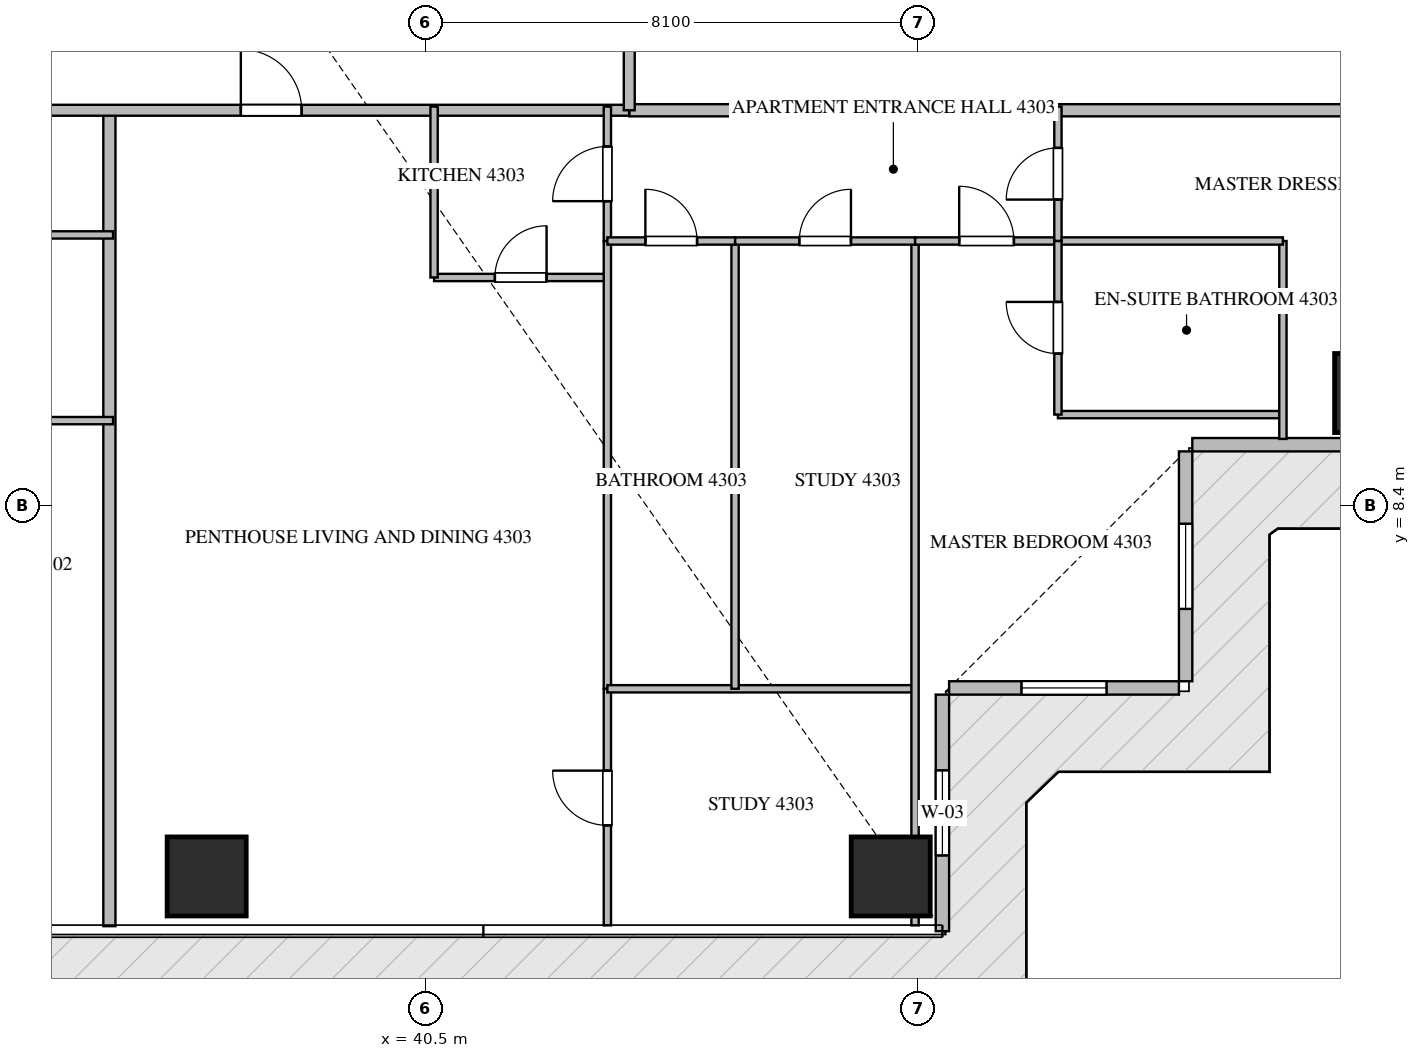
"""IFC4 building model, lengths in metres.
Left out: names, types, materials, properties, quantities, classifications, styles, units other than length and angle.
Written with IfcOpenShell. Run it as: python <this file> out.ifc"""

import sys

from ifc_helpers import new_model, si_unit, direction, frame, frame_2d, origin, origin_2d, place, context, subcontext, project, spatial, rectangle, extrude, source, transform, mapped, element, fill, save


model = new_model("IFC4")
c1 = context("Model", 3, precision=1e-05, world=origin(), true_north=direction((0.0, 1.0)))
c2 = subcontext(c1, "Body", "Model", "MODEL_VIEW")
j1 = project(units=[si_unit("LENGTHUNIT", "METRE"), si_unit("PLANEANGLEUNIT", "RADIAN")], contexts=[c1])
p1 = place(None, origin())
s1 = spatial("IfcSite", under=j1, at=p1, CompositionType="ELEMENT")
p2 = place(p1, origin())
s2 = spatial("IfcBuilding", under=s1, at=p2, CompositionType="ELEMENT")
p3 = place(p2, frame((0.0, 0.0, 172.65)))
s3 = spatial("IfcBuildingStorey", under=s2, at=p3, CompositionType="ELEMENT", Elevation=172.65)
m1 = source(origin(), c2, "Body", "SweptSolid", [
    extrude(rectangle(XDim=1.3, YDim=1.3, at=origin_2d()), origin(), (0.0, 0.0, 1.0), 3.75),
])
for number, where, z_axis, x_axis in (
    (1, (36.9, 2.3, -0.26), (0.0, 0.0, 1.0), (1.0, 0.0, 0.0)),
    (2, (48.15, 2.3, -0.26), (0.0, 0.0, 1.0), (1.0, 0.0, 0.0)),
    (3, (56.1, 10.25, -0.26), (0.0, 0.0, 1.0), (1.0, 0.0, 0.0)),
):
    element("IfcColumn", number, at=place(p3, frame(where, z_axis=z_axis, x_axis=x_axis)), inside=s3, PredefinedType="COLUMN", context=c2, shape_type="MappedRepresentation", body=[
        mapped(m1, transform((0.0, 0.0, 0.0), scale=1.0)),
    ])
p4 = place(p3, frame((49.0, 1.4, 0.0), z_axis=(0.0, 0.0, 1.0), x_axis=(0.0, 1.0, 0.0)))
e4 = element("IfcWall", 4, at=p4, inside=s3, PredefinedType="ELEMENTEDWALL", context=c2, shape_type="SweptSolid", body=[
    extrude(rectangle(XDim=3.89, YDim=0.22, at=frame_2d((1.945, 0.0))), origin(), (0.0, 0.0, 1.0), 3.475),
])
p5 = place(p4, frame((1.245, 0.0, 0.65)))
e5 = element("IfcOpeningElement", 5, at=p5, cuts=e4, PredefinedType="OPENING", context=c2, shape_type="SweptSolid", body=[
    extrude(rectangle(XDim=1.4, YDim=2.05, at=frame_2d((0.7, 1.025))), frame((0.0, 0.12, 0.0), z_axis=(0.0, -1.0, 0.0), x_axis=(1.0, 0.0, 0.0)), (0.0, 0.0, 1.0), 0.24),
])
p6 = place(p3, frame((49.11, 5.4, 0.0), z_axis=(0.0, 0.0, 1.0), x_axis=(1.0, 0.0, 0.0)))
e6 = element("IfcWall", 6, at=p6, inside=s3, PredefinedType="ELEMENTEDWALL", context=c2, shape_type="SweptSolid", body=[
    extrude(rectangle(XDim=3.78, YDim=0.22, at=frame_2d((1.89, 0.0))), origin(), (0.0, 0.0, 1.0), 3.475),
])
p7 = place(p6, frame((1.19, 0.0, 0.65)))
e7 = element("IfcOpeningElement", 7, at=p7, cuts=e6, PredefinedType="OPENING", context=c2, shape_type="SweptSolid", body=[
    extrude(rectangle(XDim=1.4, YDim=2.05, at=frame_2d((0.7, 1.025))), frame((0.0, 0.12, 0.0), z_axis=(0.0, -1.0, 0.0), x_axis=(1.0, 0.0, 0.0)), (0.0, 0.0, 1.0), 0.24),
])
p8 = place(p3, frame((53.0, 5.51, 0.0), z_axis=(0.0, 0.0, 1.0), x_axis=(0.0, 1.0, 0.0)))
e8 = element("IfcWall", 8, at=p8, inside=s3, PredefinedType="ELEMENTEDWALL", context=c2, shape_type="SweptSolid", body=[
    extrude(rectangle(XDim=3.78, YDim=0.22, at=frame_2d((1.89, 0.0))), origin(), (0.0, 0.0, 1.0), 3.475),
])
p9 = place(p8, frame((1.19, 0.0, 0.65)))
e9 = element("IfcOpeningElement", 9, at=p9, cuts=e8, PredefinedType="OPENING", context=c2, shape_type="SweptSolid", body=[
    extrude(rectangle(XDim=1.4, YDim=2.05, at=frame_2d((0.7, 1.025))), frame((0.0, 0.12, 0.0), z_axis=(0.0, -1.0, 0.0), x_axis=(1.0, 0.0, 0.0)), (0.0, 0.0, 1.0), 0.24),
])
p10 = place(p3, frame((53.11, 9.4, 0.0), z_axis=(0.0, 0.0, 1.0), x_axis=(1.0, 0.0, 0.0)))
e10 = element("IfcWall", 10, at=p10, inside=s3, PredefinedType="ELEMENTEDWALL", context=c2, shape_type="SweptSolid", body=[
    extrude(rectangle(XDim=3.89, YDim=0.22, at=frame_2d((1.945, 0.0))), origin(), (0.0, 0.0, 1.0), 3.475),
])
p11 = place(p3, frame((35.3, 1.482, 0.0), z_axis=(0.0, 0.0, 1.0), x_axis=(0.0, 1.0, 0.0)))
e11 = element("IfcWall", 11, at=p11, inside=s3, PredefinedType="PARTITIONING", context=c2, shape_type="SweptSolid", body=[
    extrude(rectangle(XDim=13.418, YDim=0.2, at=frame_2d((6.709, 0.0))), origin(), (0.0, 0.0, 1.0), 3.49),
])
p12 = place(p3, frame((43.85, 14.9, 0.0), z_axis=(0.0, 0.0, 1.0), x_axis=(1.0, 0.0, 0.0)))
e12 = element("IfcWall", 12, at=p12, inside=s3, PredefinedType="PARTITIONING", context=c2, shape_type="SweptSolid", body=[
    extrude(rectangle(XDim=13.068, YDim=0.2, at=frame_2d((6.534, 0.0))), origin(), (0.0, 0.0, 1.0), 3.49),
])
p13 = place(p3, frame((20.952, 14.9, 0.0), z_axis=(0.0, 0.0, 1.0), x_axis=(1.0, 0.0, 0.0)))
e13 = element("IfcWall", 13, at=p13, inside=s3, PredefinedType="PARTITIONING", context=c2, shape_type="SweptSolid", body=[
    extrude(rectangle(XDim=22.896, YDim=0.18, at=frame_2d((11.448, 0.0))), origin(), (0.0, 0.0, 1.0), 3.49),
])
p14 = place(p13, frame((2.387, 0.0, 0.0)))
e14 = element("IfcOpeningElement", 14, at=p14, cuts=e13, PredefinedType="OPENING", context=c2, shape_type="SweptSolid", body=[
    extrude(rectangle(XDim=1.0, YDim=2.15, at=frame_2d((0.5, 1.075))), frame((0.0, 0.1, 0.0), z_axis=(0.0, -1.0, 0.0), x_axis=(1.0, 0.0, 0.0)), (0.0, 0.0, 1.0), 0.2),
])
p15 = place(p13, frame((6.591, 0.0, 0.0)))
e15 = element("IfcOpeningElement", 15, at=p15, cuts=e13, PredefinedType="OPENING", context=c2, shape_type="SweptSolid", body=[
    extrude(rectangle(XDim=1.0, YDim=2.15, at=frame_2d((0.5, 1.075))), frame((0.0, 0.1, 0.0), z_axis=(0.0, -1.0, 0.0), x_axis=(1.0, 0.0, 0.0)), (0.0, 0.0, 1.0), 0.2),
])
p16 = place(p13, frame((16.51, 0.0, 0.0)))
e16 = element("IfcOpeningElement", 16, at=p16, cuts=e13, PredefinedType="OPENING", context=c2, shape_type="SweptSolid", body=[
    extrude(rectangle(XDim=1.0, YDim=2.15, at=frame_2d((0.5, 1.075))), frame((0.0, 0.1, 0.0), z_axis=(0.0, -1.0, 0.0), x_axis=(1.0, 0.0, 0.0)), (0.0, 0.0, 1.0), 0.2),
])
p17 = place(p3, frame((43.85, 14.9, 0.0), z_axis=(0.0, 0.0, 1.0), x_axis=(0.0, 1.0, 0.0)))
e17 = element("IfcWall", 17, at=p17, inside=s3, PredefinedType="PARTITIONING", context=c2, shape_type="SweptSolid", body=[
    extrude(rectangle(XDim=18.7, YDim=0.18, at=frame_2d((9.35, 0.0))), origin(), (0.0, 0.0, 1.0), 3.49),
])
p18 = place(p17, frame((1.805, 0.0, 0.0)))
e18 = element("IfcOpeningElement", 18, at=p18, cuts=e17, PredefinedType="OPENING", context=c2, shape_type="SweptSolid", body=[
    extrude(rectangle(XDim=1.0, YDim=2.15, at=frame_2d((0.5, 1.075))), frame((0.0, 0.1, 0.0), z_axis=(0.0, -1.0, 0.0), x_axis=(1.0, 0.0, 0.0)), (0.0, 0.0, 1.0), 0.2),
])
for number, where, z_axis, x_axis in (
    (19, (30.3, 9.796, 0.0), (0.0, 0.0, 1.0), (1.0, 0.0, 0.0)),
    (20, (30.3, 12.85, 0.0), (0.0, 0.0, 1.0), (1.0, 0.0, 0.0)),
):
    element("IfcWall", number, at=place(p3, frame(where, z_axis=z_axis, x_axis=x_axis)), inside=s3, PredefinedType="PARTITIONING", context=c2, shape_type="SweptSolid", body=[
        extrude(rectangle(XDim=5.06, YDim=0.12, at=frame_2d((2.53, 0.0))), origin(), (0.0, 0.0, 1.0), 3.49),
    ])
p19 = place(p3, frame((40.64, 12.15, 0.0), z_axis=(0.0, 0.0, 1.0), x_axis=(1.0, 0.0, 0.0)))
e21 = element("IfcWall", 21, at=p19, inside=s3, PredefinedType="PARTITIONING", context=c2, shape_type="SweptSolid", body=[
    extrude(rectangle(XDim=2.85, YDim=0.12, at=frame_2d((1.425, 0.0))), origin(), (0.0, 0.0, 1.0), 3.49),
])
p20 = place(p19, frame((1.0, 0.0, 0.0)))
e22 = element("IfcOpeningElement", 22, at=p20, cuts=e21, PredefinedType="OPENING", context=c2, shape_type="SweptSolid", body=[
    extrude(rectangle(XDim=0.85, YDim=2.1, at=frame_2d((0.425, 1.05))), frame((0.0, 0.07, 0.0), z_axis=(0.0, -1.0, 0.0), x_axis=(1.0, 0.0, 0.0)), (0.0, 0.0, 1.0), 0.14),
])
p21 = place(p3, frame((40.64, 12.15, 0.0), z_axis=(0.0, 0.0, 1.0), x_axis=(0.0, 1.0, 0.0)))
e23 = element("IfcWall", 23, at=p21, inside=s3, PredefinedType="PARTITIONING", context=c2, shape_type="SweptSolid", body=[
    extrude(rectangle(XDim=2.81, YDim=0.12, at=frame_2d((1.405, 0.0))), origin(), (0.0, 0.0, 1.0), 3.49),
])
p22 = place(p3, frame((43.49, 12.75, 0.0), z_axis=(0.0, 0.0, 1.0), x_axis=(0.0, 1.0, 0.0)))
e24 = element("IfcWall", 24, at=p22, inside=s3, PredefinedType="PARTITIONING", context=c2, shape_type="SweptSolid", body=[
    extrude(rectangle(XDim=2.21, YDim=0.12, at=frame_2d((1.105, 0.0))), origin(), (0.0, 0.0, 1.0), 3.49),
])
p23 = place(p22, frame((0.655, 0.0, 0.0)))
e25 = element("IfcOpeningElement", 25, at=p23, cuts=e24, PredefinedType="OPENING", context=c2, shape_type="SweptSolid", body=[
    extrude(rectangle(XDim=0.9, YDim=2.1, at=frame_2d((0.45, 1.05))), frame((0.0, 0.07, 0.0), z_axis=(0.0, -1.0, 0.0), x_axis=(1.0, 0.0, 0.0)), (0.0, 0.0, 1.0), 0.14),
])
p24 = place(p3, frame((43.49, 1.495, 0.0), z_axis=(0.0, 0.0, 1.0), x_axis=(0.0, 1.0, 0.0)))
e26 = element("IfcWall", 26, at=p24, inside=s3, PredefinedType="PARTITIONING", context=c2, shape_type="SweptSolid", body=[
    extrude(rectangle(XDim=3.891, YDim=0.12, at=frame_2d((1.945, 0.0))), origin(), (0.0, 0.0, 1.0), 3.49),
])
p25 = place(p24, frame((1.645, 0.0, 0.0)))
e27 = element("IfcOpeningElement", 27, at=p25, cuts=e26, PredefinedType="OPENING", context=c2, shape_type="SweptSolid", body=[
    extrude(rectangle(XDim=0.9, YDim=2.1, at=frame_2d((0.45, 1.05))), frame((0.0, 0.07, 0.0), z_axis=(0.0, -1.0, 0.0), x_axis=(1.0, 0.0, 0.0)), (0.0, 0.0, 1.0), 0.14),
])
p26 = place(p3, frame((43.49, 5.388, 0.0), z_axis=(0.0, 0.0, 1.0), x_axis=(0.0, 1.0, 0.0)))
e28 = element("IfcWall", 28, at=p26, inside=s3, PredefinedType="PARTITIONING", context=c2, shape_type="SweptSolid", body=[
    extrude(rectangle(XDim=7.36, YDim=0.12, at=frame_2d((3.68, 0.0))), origin(), (0.0, 0.0, 1.0), 3.49),
])
p27 = place(p3, frame((43.49, 5.386, 0.0), z_axis=(0.0, 0.0, 1.0), x_axis=(1.0, 0.0, 0.0)))
e29 = element("IfcWall", 29, at=p27, inside=s3, PredefinedType="PARTITIONING", context=c2, shape_type="SweptSolid", body=[
    extrude(rectangle(XDim=5.06, YDim=0.12, at=frame_2d((2.53, 0.0))), origin(), (0.0, 0.0, 1.0), 3.49),
])
p28 = place(p3, frame((48.55, 1.495, 0.0), z_axis=(0.0, 0.0, 1.0), x_axis=(0.0, 1.0, 0.0)))
e30 = element("IfcWall", 30, at=p28, inside=s3, PredefinedType="PARTITIONING", context=c2, shape_type="SweptSolid", body=[
    extrude(rectangle(XDim=11.255, YDim=0.12, at=frame_2d((5.627, 0.0))), origin(), (0.0, 0.0, 1.0), 3.49),
])
p29 = place(p3, frame((45.59, 5.386, 0.0), z_axis=(0.0, 0.0, 1.0), x_axis=(0.0, 1.0, 0.0)))
e31 = element("IfcWall", 31, at=p29, inside=s3, PredefinedType="PARTITIONING", context=c2, shape_type="SweptSolid", body=[
    extrude(rectangle(XDim=7.364, YDim=0.12, at=frame_2d((3.682, 0.0))), origin(), (0.0, 0.0, 1.0), 3.49),
])
p30 = place(p3, frame((43.49, 12.75, 0.0), z_axis=(0.0, 0.0, 1.0), x_axis=(1.0, 0.0, 0.0)))
e32 = element("IfcWall", 32, at=p30, inside=s3, PredefinedType="PARTITIONING", context=c2, shape_type="SweptSolid", body=[
    extrude(rectangle(XDim=2.1, YDim=0.12, at=frame_2d((1.05, 0.0))), origin(), (0.0, 0.0, 1.0), 3.49),
])
p31 = place(p30, frame((0.625, 0.0, 0.0)))
e33 = element("IfcOpeningElement", 33, at=p31, cuts=e32, PredefinedType="OPENING", context=c2, shape_type="SweptSolid", body=[
    extrude(rectangle(XDim=0.85, YDim=2.1, at=frame_2d((0.425, 1.05))), frame((0.0, 0.07, 0.0), z_axis=(0.0, -1.0, 0.0), x_axis=(1.0, 0.0, 0.0)), (0.0, 0.0, 1.0), 0.14),
])
p32 = place(p3, frame((45.592, 12.75, 0.0), z_axis=(0.0, 0.0, 1.0), x_axis=(1.0, 0.0, 0.0)))
e34 = element("IfcWall", 34, at=p32, inside=s3, PredefinedType="PARTITIONING", context=c2, shape_type="SweptSolid", body=[
    extrude(rectangle(XDim=2.958, YDim=0.12, at=frame_2d((1.479, 0.0))), origin(), (0.0, 0.0, 1.0), 3.49),
])
p33 = place(p32, frame((1.054, 0.0, 0.0)))
e35 = element("IfcOpeningElement", 35, at=p33, cuts=e34, PredefinedType="OPENING", context=c2, shape_type="SweptSolid", body=[
    extrude(rectangle(XDim=0.85, YDim=2.1, at=frame_2d((0.425, 1.05))), frame((0.0, 0.07, 0.0), z_axis=(0.0, -1.0, 0.0), x_axis=(1.0, 0.0, 0.0)), (0.0, 0.0, 1.0), 0.14),
])
p34 = place(p3, frame((48.552, 12.75, 0.0), z_axis=(0.0, 0.0, 1.0), x_axis=(1.0, 0.0, 0.0)))
e36 = element("IfcWall", 36, at=p34, inside=s3, PredefinedType="PARTITIONING", context=c2, shape_type="SweptSolid", body=[
    extrude(rectangle(XDim=2.348, YDim=0.12, at=frame_2d((1.174, 0.0))), origin(), (0.0, 0.0, 1.0), 3.49),
])
p35 = place(p34, frame((0.724, 0.0, 0.0)))
e37 = element("IfcOpeningElement", 37, at=p35, cuts=e36, PredefinedType="OPENING", context=c2, shape_type="SweptSolid", body=[
    extrude(rectangle(XDim=0.9, YDim=2.1, at=frame_2d((0.45, 1.05))), frame((0.0, 0.07, 0.0), z_axis=(0.0, -1.0, 0.0), x_axis=(1.0, 0.0, 0.0)), (0.0, 0.0, 1.0), 0.14),
])
p36 = place(p3, frame((50.9, 9.895, 0.0), z_axis=(0.0, 0.0, 1.0), x_axis=(1.0, 0.0, 0.0)))
e38 = element("IfcWall", 38, at=p36, inside=s3, PredefinedType="PARTITIONING", context=c2, shape_type="SweptSolid", body=[
    extrude(rectangle(XDim=3.7, YDim=0.12, at=frame_2d((1.85, 0.0))), origin(), (0.0, 0.0, 1.0), 3.49),
])
p37 = place(p3, frame((54.6, 9.495, 0.0), z_axis=(0.0, 0.0, 1.0), x_axis=(0.0, 1.0, 0.0)))
e39 = element("IfcWall", 39, at=p37, inside=s3, PredefinedType="PARTITIONING", context=c2, shape_type="SweptSolid", body=[
    extrude(rectangle(XDim=3.255, YDim=0.12, at=frame_2d((1.627, 0.0))), origin(), (0.0, 0.0, 1.0), 3.49),
])
p38 = place(p3, frame((50.902, 12.75, 0.0), z_axis=(0.0, 0.0, 1.0), x_axis=(1.0, 0.0, 0.0)))
e40 = element("IfcWall", 40, at=p38, inside=s3, PredefinedType="PARTITIONING", context=c2, shape_type="SweptSolid", body=[
    extrude(rectangle(XDim=3.698, YDim=0.12, at=frame_2d((1.849, 0.0))), origin(), (0.0, 0.0, 1.0), 3.49),
])
p39 = place(p3, frame((50.9, 9.895, 0.0), z_axis=(0.0, 0.0, 1.0), x_axis=(0.0, 1.0, 0.0)))
e41 = element("IfcWall", 41, at=p39, inside=s3, PredefinedType="PARTITIONING", context=c2, shape_type="SweptSolid", body=[
    extrude(rectangle(XDim=2.855, YDim=0.12, at=frame_2d((1.427, 0.0))), origin(), (0.0, 0.0, 1.0), 3.49),
])
p40 = place(p39, frame((1.003, 0.0, 0.0)))
e42 = element("IfcOpeningElement", 42, at=p40, cuts=e41, PredefinedType="OPENING", context=c2, shape_type="SweptSolid", body=[
    extrude(rectangle(XDim=0.85, YDim=2.1, at=frame_2d((0.425, 1.05))), frame((0.0, 0.07, 0.0), z_axis=(0.0, -1.0, 0.0), x_axis=(1.0, 0.0, 0.0)), (0.0, 0.0, 1.0), 0.14),
])
p41 = place(p3, frame((50.9, 12.752, 0.0), z_axis=(0.0, 0.0, 1.0), x_axis=(0.0, 1.0, 0.0)))
e43 = element("IfcWall", 43, at=p41, inside=s3, PredefinedType="PARTITIONING", context=c2, shape_type="SweptSolid", body=[
    extrude(rectangle(XDim=2.208, YDim=0.12, at=frame_2d((1.104, 0.0))), origin(), (0.0, 0.0, 1.0), 3.49),
])
p42 = place(p41, frame((0.679, 0.0, 0.0)))
e44 = element("IfcOpeningElement", 44, at=p42, cuts=e43, PredefinedType="OPENING", context=c2, shape_type="SweptSolid", body=[
    extrude(rectangle(XDim=0.85, YDim=2.1, at=frame_2d((0.425, 1.05))), frame((0.0, 0.07, 0.0), z_axis=(0.0, -1.0, 0.0), x_axis=(1.0, 0.0, 0.0)), (0.0, 0.0, 1.0), 0.14),
])
m2 = source(origin(), c2, "Body", "SweptSolid", [
    extrude(rectangle(XDim=1.4, YDim=2.05, at=frame_2d((0.7, 1.025))), frame((0.0, 0.03, 0.0), z_axis=(0.0, -1.0, 0.0), x_axis=(1.0, 0.0, 0.0)), (0.0, 0.0, 1.0), 0.06),
])
p43 = place(p5, origin())
e45 = element("IfcWindow", 45, at=p43, inside=s3, PartitioningType="SINGLE_PANEL", PredefinedType="WINDOW", context=c2, shape_type="MappedRepresentation", body=[
    mapped(m2, transform((0.0, 0.0, 0.0), scale=1.0)),
])
fill(e5, e45)
p44 = place(p7, origin())
e46 = element("IfcWindow", 46, at=p44, inside=s3, PartitioningType="SINGLE_PANEL", PredefinedType="WINDOW", context=c2, shape_type="MappedRepresentation", body=[
    mapped(m2, transform((0.0, 0.0, 0.0), scale=1.0)),
])
fill(e7, e46)
p45 = place(p9, origin())
e47 = element("IfcWindow", 47, at=p45, inside=s3, PartitioningType="SINGLE_PANEL", PredefinedType="WINDOW", context=c2, shape_type="MappedRepresentation", body=[
    mapped(m2, transform((0.0, 0.0, 0.0), scale=1.0)),
])
fill(e9, e47)
m3 = source(origin(), c2, "Body", "SweptSolid", [
    extrude(rectangle(XDim=1.0, YDim=2.15, at=frame_2d((0.5, 1.075))), frame((0.0, 0.025, 0.0), z_axis=(0.0, -1.0, 0.0), x_axis=(1.0, 0.0, 0.0)), (0.0, 0.0, 1.0), 0.05),
])
p46 = place(p16, origin())
e48 = element("IfcDoor", 48, at=p46, inside=s3, OperationType="SINGLE_SWING_LEFT", PredefinedType="DOOR", context=c2, shape_type="MappedRepresentation", body=[
    mapped(m3, transform((0.0, 0.0, 0.0), scale=1.0)),
])
fill(e16, e48)
m4 = source(origin(), c2, "Body", "SweptSolid", [
    extrude(rectangle(XDim=0.85, YDim=2.1, at=frame_2d((0.425, 1.05))), frame((0.0, 0.025, 0.0), z_axis=(0.0, -1.0, 0.0), x_axis=(1.0, 0.0, 0.0)), (0.0, 0.0, 1.0), 0.05),
])
p47 = place(p20, origin())
e49 = element("IfcDoor", 49, at=p47, inside=s3, OperationType="SINGLE_SWING_RIGHT", PredefinedType="DOOR", context=c2, shape_type="MappedRepresentation", body=[
    mapped(m4, transform((0.0, 0.0, 0.0), scale=1.0)),
])
fill(e22, e49)
m5 = source(origin(), c2, "Body", "SweptSolid", [
    extrude(rectangle(XDim=0.9, YDim=2.1, at=frame_2d((0.45, 1.05))), frame((0.0, 0.025, 0.0), z_axis=(0.0, -1.0, 0.0), x_axis=(1.0, 0.0, 0.0)), (0.0, 0.0, 1.0), 0.05),
])
p48 = place(p23, origin())
e50 = element("IfcDoor", 50, at=p48, inside=s3, OperationType="SINGLE_SWING_LEFT", PredefinedType="DOOR", context=c2, shape_type="MappedRepresentation", body=[
    mapped(m5, transform((0.0, 0.0, 0.0), scale=1.0)),
])
fill(e25, e50)
p49 = place(p25, origin())
e51 = element("IfcDoor", 51, at=p49, inside=s3, OperationType="SINGLE_SWING_RIGHT", PredefinedType="DOOR", context=c2, shape_type="MappedRepresentation", body=[
    mapped(m5, transform((0.0, 0.0, 0.0), scale=1.0)),
])
fill(e27, e51)
p50 = place(p31, origin())
e52 = element("IfcDoor", 52, at=p50, inside=s3, OperationType="SINGLE_SWING_LEFT", PredefinedType="DOOR", context=c2, shape_type="MappedRepresentation", body=[
    mapped(m4, transform((0.0, 0.0, 0.0), scale=1.0)),
])
fill(e33, e52)
p51 = place(p33, origin())
e53 = element("IfcDoor", 53, at=p51, inside=s3, OperationType="SINGLE_SWING_RIGHT", PredefinedType="DOOR", context=c2, shape_type="MappedRepresentation", body=[
    mapped(m4, transform((0.0, 0.0, 0.0), scale=1.0)),
])
fill(e35, e53)
p52 = place(p35, origin())
e54 = element("IfcDoor", 54, at=p52, inside=s3, OperationType="SINGLE_SWING_LEFT", PredefinedType="DOOR", context=c2, shape_type="MappedRepresentation", body=[
    mapped(m5, transform((0.0, 0.0, 0.0), scale=1.0)),
])
fill(e37, e54)
p53 = place(p40, origin())
e55 = element("IfcDoor", 55, at=p53, inside=s3, OperationType="SINGLE_SWING_RIGHT", PredefinedType="DOOR", context=c2, shape_type="MappedRepresentation", body=[
    mapped(m4, transform((0.0, 0.0, 0.0), scale=1.0)),
])
fill(e42, e55)
p54 = place(p42, origin())
e56 = element("IfcDoor", 56, at=p54, inside=s3, OperationType="SINGLE_SWING_LEFT", PredefinedType="DOOR", context=c2, shape_type="MappedRepresentation", body=[
    mapped(m4, transform((0.0, 0.0, 0.0), scale=1.0)),
])
fill(e44, e56)
save(model, sys.argv[1])
